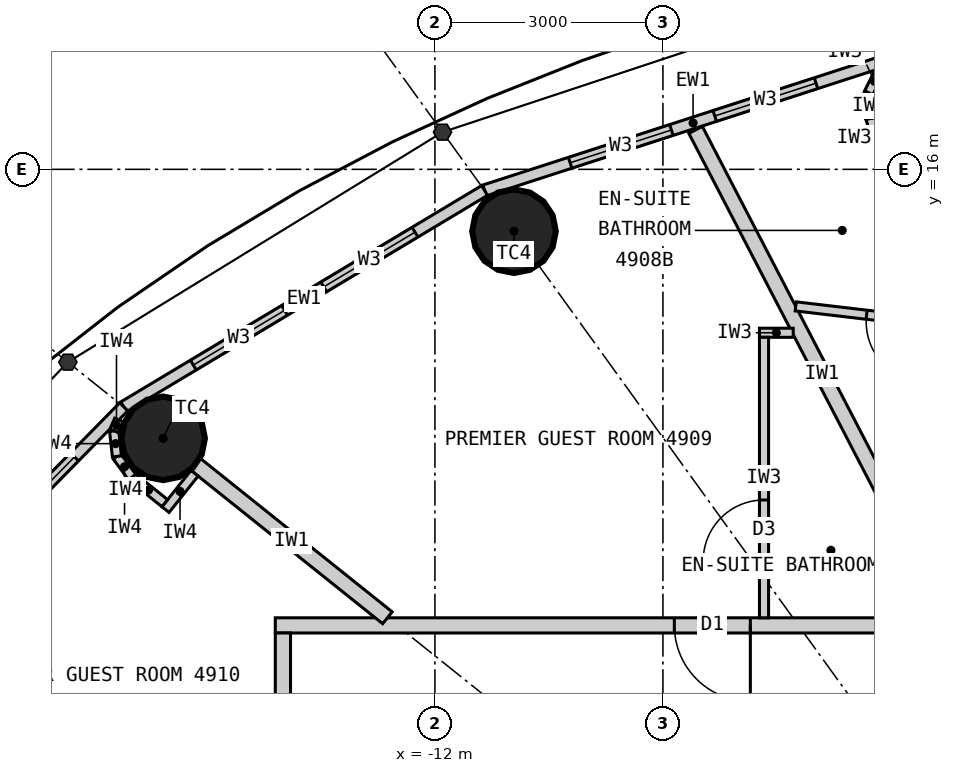
"""IFC4 building model, lengths in metres.
Left out: names, types, materials, properties, quantities, classifications, styles, units other than length and angle.
Written with IfcOpenShell. Run it as: python <this file> out.ifc"""

import sys

from ifc_helpers import new_model, si_unit, direction, frame, frame_2d, origin, origin_2d, place, context, subcontext, project, spatial, rectangle, circle, extrude, clip, halfspace, element, fill, save


model = new_model("IFC4")
c1 = context("Model", 3, precision=1e-05, world=origin(), true_north=direction((0.0, 1.0)))
c2 = subcontext(c1, "Body", "Model", "MODEL_VIEW")
j1 = project(units=[si_unit("LENGTHUNIT", "METRE"), si_unit("PLANEANGLEUNIT", "RADIAN")], contexts=[c1])
p1 = place(None, origin())
s1 = spatial("IfcSite", under=j1, at=p1, CompositionType="ELEMENT")
p2 = place(p1, origin())
s2 = spatial("IfcBuilding", under=s1, at=p2, CompositionType="ELEMENT")
p3 = place(p2, frame((0.0, 0.0, 183.0)))
s3 = spatial("IfcBuildingStorey", under=s2, at=p3, CompositionType="ELEMENT", Elevation=183.0)
for number, where, z_axis, x_axis in (
    (1, (-10.96, 15.186, 0.0), (0.0, 0.0, 1.0), (1.0, 0.0, 0.0)),
    (2, (-15.576, 12.461, 0.0), (0.0, 0.0, 1.0), (1.0, 0.0, 0.0)),
):
    element("IfcColumn", number, at=place(p3, frame(where, z_axis=z_axis, x_axis=x_axis)), inside=s3, PredefinedType="COLUMN", context=c2, shape_type="Clipping", body=[
        clip(extrude(circle(Radius=0.55, at=origin_2d()), origin(), (0.0, 0.0, 1.0), 3.3), halfspace(frame((0.0, 0.0, 2.25), z_axis=(0.0, 0.0, 1.0), x_axis=(1.0, 0.0, 0.0)), False)),
    ])
p4 = place(p3, frame((-5.86, 17.497, 0.0), z_axis=(0.0, 0.0, 1.0), x_axis=(-0.951432482129, -0.307857486429, 0.0)))
e3 = element("IfcWall", 3, at=p4, inside=s3, PredefinedType="ELEMENTEDWALL", context=c2, shape_type="SweptSolid", body=[
    extrude(rectangle(XDim=5.766, YDim=0.15, at=frame_2d((2.883, 0.0))), origin(), (0.0, 0.0, 1.0), 3.05),
])
p5 = place(p4, frame((1.183, 0.0, 0.9)))
e4 = element("IfcOpeningElement", 4, at=p5, cuts=e3, PredefinedType="OPENING", context=c2, shape_type="SweptSolid", body=[
    extrude(rectangle(XDim=1.4, YDim=1.9, at=frame_2d((0.7, 0.95))), frame((0.0, 0.085, 0.0), z_axis=(0.0, -1.0, 0.0), x_axis=(1.0, 0.0, 0.0)), (0.0, 0.0, 1.0), 0.17),
])
p6 = place(p4, frame((3.183, 0.0, 0.9)))
e5 = element("IfcOpeningElement", 5, at=p6, cuts=e3, PredefinedType="OPENING", context=c2, shape_type="SweptSolid", body=[
    extrude(rectangle(XDim=1.4, YDim=1.9, at=frame_2d((0.7, 0.95))), frame((0.0, 0.085, 0.0), z_axis=(0.0, -1.0, 0.0), x_axis=(1.0, 0.0, 0.0)), (0.0, 0.0, 1.0), 0.17),
])
p7 = place(p3, frame((-11.346, 15.722, 0.0), z_axis=(0.0, 0.0, 1.0), x_axis=(-0.857695199231, -0.514158482587, 0.0)))
e6 = element("IfcWall", 6, at=p7, inside=s3, PredefinedType="ELEMENTEDWALL", context=c2, shape_type="SweptSolid", body=[
    extrude(rectangle(XDim=5.536, YDim=0.15, at=frame_2d((2.768, 0.0))), origin(), (0.0, 0.0, 1.0), 3.05),
])
p8 = place(p7, frame((1.068, 0.0, 0.9)))
e7 = element("IfcOpeningElement", 7, at=p8, cuts=e6, PredefinedType="OPENING", context=c2, shape_type="SweptSolid", body=[
    extrude(rectangle(XDim=1.4, YDim=1.9, at=frame_2d((0.7, 0.95))), frame((0.0, 0.085, 0.0), z_axis=(0.0, -1.0, 0.0), x_axis=(1.0, 0.0, 0.0)), (0.0, 0.0, 1.0), 0.17),
])
p9 = place(p7, frame((3.068, 0.0, 0.9)))
e8 = element("IfcOpeningElement", 8, at=p9, cuts=e6, PredefinedType="OPENING", context=c2, shape_type="SweptSolid", body=[
    extrude(rectangle(XDim=1.4, YDim=1.9, at=frame_2d((0.7, 0.95))), frame((0.0, 0.085, 0.0), z_axis=(0.0, -1.0, 0.0), x_axis=(1.0, 0.0, 0.0)), (0.0, 0.0, 1.0), 0.17),
])
p10 = place(p3, frame((-16.095, 12.876, 0.0), z_axis=(0.0, 0.0, 1.0), x_axis=(-0.700727467776, -0.71342905457, 0.0)))
e9 = element("IfcWall", 9, at=p10, inside=s3, PredefinedType="ELEMENTEDWALL", context=c2, shape_type="SweptSolid", body=[
    extrude(rectangle(XDim=5.247, YDim=0.15, at=frame_2d((2.624, 0.0))), origin(), (0.0, 0.0, 1.0), 3.05),
])
p11 = place(p10, frame((0.924, 0.0, 0.9)))
e10 = element("IfcOpeningElement", 10, at=p11, cuts=e9, PredefinedType="OPENING", context=c2, shape_type="SweptSolid", body=[
    extrude(rectangle(XDim=1.4, YDim=1.9, at=frame_2d((0.7, 0.95))), frame((0.0, 0.085, 0.0), z_axis=(0.0, -1.0, 0.0), x_axis=(1.0, 0.0, 0.0)), (0.0, 0.0, 1.0), 0.17),
])
p12 = place(p10, frame((2.924, 0.0, 0.9)))
e11 = element("IfcOpeningElement", 11, at=p12, cuts=e9, PredefinedType="OPENING", context=c2, shape_type="SweptSolid", body=[
    extrude(rectangle(XDim=1.4, YDim=1.9, at=frame_2d((0.7, 0.95))), frame((0.0, 0.085, 0.0), z_axis=(0.0, -1.0, 0.0), x_axis=(1.0, 0.0, 0.0)), (0.0, 0.0, 1.0), 0.17),
])
p13 = place(p3, frame((-14.1, 10.0, 0.0), z_axis=(0.0, 0.0, 1.0), x_axis=(1.0, 0.0, 0.0)))
e12 = element("IfcWall", 12, at=p13, inside=s3, PredefinedType="PARTITIONING", context=c2, shape_type="SweptSolid", body=[
    extrude(rectangle(XDim=28.2, YDim=0.2, at=frame_2d((14.1, 0.0))), origin(), (0.0, 0.0, 1.0), 3.05),
])
p14 = place(p13, frame((24.549, 0.0, 0.0)))
e13 = element("IfcOpeningElement", 13, at=p14, cuts=e12, PredefinedType="OPENING", context=c2, shape_type="SweptSolid", body=[
    extrude(rectangle(XDim=1.0, YDim=2.2, at=frame_2d((0.5, 1.1))), frame((0.0, 0.11, 0.0), z_axis=(0.0, -1.0, 0.0), x_axis=(1.0, 0.0, 0.0)), (0.0, 0.0, 1.0), 0.22),
])
p15 = place(p13, frame((18.829, 0.0, 0.0)))
e14 = element("IfcOpeningElement", 14, at=p15, cuts=e12, PredefinedType="OPENING", context=c2, shape_type="SweptSolid", body=[
    extrude(rectangle(XDim=1.0, YDim=2.2, at=frame_2d((0.5, 1.1))), frame((0.0, 0.11, 0.0), z_axis=(0.0, -1.0, 0.0), x_axis=(1.0, 0.0, 0.0)), (0.0, 0.0, 1.0), 0.22),
])
p16 = place(p13, frame((12.8, 0.0, 0.0)))
e15 = element("IfcOpeningElement", 15, at=p16, cuts=e12, PredefinedType="OPENING", context=c2, shape_type="SweptSolid", body=[
    extrude(rectangle(XDim=1.0, YDim=2.2, at=frame_2d((0.5, 1.1))), frame((0.0, 0.11, 0.0), z_axis=(0.0, -1.0, 0.0), x_axis=(1.0, 0.0, 0.0)), (0.0, 0.0, 1.0), 0.22),
])
p17 = place(p13, frame((5.25, 0.0, 0.0)))
e16 = element("IfcOpeningElement", 16, at=p17, cuts=e12, PredefinedType="OPENING", context=c2, shape_type="SweptSolid", body=[
    extrude(rectangle(XDim=1.0, YDim=2.2, at=frame_2d((0.5, 1.1))), frame((0.0, 0.11, 0.0), z_axis=(0.0, -1.0, 0.0), x_axis=(1.0, 0.0, 0.0)), (0.0, 0.0, 1.0), 0.22),
])
p18 = place(p3, frame((-14.0, 9.9, 0.0), z_axis=(0.0, 0.0, 1.0), x_axis=(0.0, -1.0, 0.0)))
e17 = element("IfcWall", 17, at=p18, inside=s3, PredefinedType="PARTITIONING", context=c2, shape_type="SweptSolid", body=[
    extrude(rectangle(XDim=19.8, YDim=0.2, at=frame_2d((9.9, 0.0))), origin(), (0.0, 0.0, 1.0), 3.05),
])
p19 = place(p18, frame((17.701, 0.0, 0.0)))
e18 = element("IfcOpeningElement", 18, at=p19, cuts=e17, PredefinedType="OPENING", context=c2, shape_type="SweptSolid", body=[
    extrude(rectangle(XDim=1.0, YDim=2.2, at=frame_2d((0.5, 1.1))), frame((0.0, 0.11, 0.0), z_axis=(0.0, -1.0, 0.0), x_axis=(1.0, 0.0, 0.0)), (0.0, 0.0, 1.0), 0.22),
])
p20 = place(p18, frame((1.1, 0.0, 0.0)))
e19 = element("IfcOpeningElement", 19, at=p20, cuts=e17, PredefinedType="OPENING", context=c2, shape_type="SweptSolid", body=[
    extrude(rectangle(XDim=1.0, YDim=2.2, at=frame_2d((0.5, 1.1))), frame((0.0, 0.11, 0.0), z_axis=(0.0, -1.0, 0.0), x_axis=(1.0, 0.0, 0.0)), (0.0, 0.0, 1.0), 0.22),
])
p21 = place(p18, frame((6.574, 0.0, 0.0)))
e20 = element("IfcOpeningElement", 20, at=p21, cuts=e17, PredefinedType="OPENING", context=c2, shape_type="SweptSolid", body=[
    extrude(rectangle(XDim=1.0, YDim=2.2, at=frame_2d((0.5, 1.1))), frame((0.0, 0.11, 0.0), z_axis=(0.0, -1.0, 0.0), x_axis=(1.0, 0.0, 0.0)), (0.0, 0.0, 1.0), 0.22),
])
p22 = place(p18, frame((12.465, 0.0, 0.0)))
e21 = element("IfcOpeningElement", 21, at=p22, cuts=e17, PredefinedType="OPENING", context=c2, shape_type="SweptSolid", body=[
    extrude(rectangle(XDim=1.0, YDim=2.1, at=frame_2d((0.5, 1.05))), frame((0.0, 0.11, 0.0), z_axis=(0.0, -1.0, 0.0), x_axis=(1.0, 0.0, 0.0)), (0.0, 0.0, 1.0), 0.22),
])
p23 = place(p3, frame((-5.24, 10.1, 0.0), z_axis=(0.0, 0.0, 1.0), x_axis=(-0.460532965373, 0.887642601391, 0.0)))
e22 = element("IfcWall", 22, at=p23, inside=s3, PredefinedType="PARTITIONING", context=c2, shape_type="SweptSolid", body=[
    extrude(rectangle(XDim=7.231, YDim=0.2, at=frame_2d((3.616, 0.0))), origin(), (0.0, 0.0, 1.0), 3.05),
])
p24 = place(p3, frame((-12.625, 10.1, 0.0), z_axis=(0.0, 0.0, 1.0), x_axis=(-0.780876185034, 0.624685827954, 0.0)))
e23 = element("IfcWall", 23, at=p24, inside=s3, PredefinedType="PARTITIONING", context=c2, shape_type="SweptSolid", body=[
    extrude(rectangle(XDim=3.229, YDim=0.2, at=frame_2d((1.615, 0.0))), origin(), (0.0, 0.0, 1.0), 2.25),
])
p25 = place(p3, frame((-7.253, 14.197, 0.0), z_axis=(0.0, 0.0, 1.0), x_axis=(0.993128188393, -0.117031625725, 0.0)))
e24 = element("IfcWall", 24, at=p25, inside=s3, PredefinedType="PARTITIONING", context=c2, shape_type="SweptSolid", body=[
    extrude(rectangle(XDim=2.678, YDim=0.12, at=frame_2d((1.339, 0.0))), origin(), (0.0, 0.0, 1.0), 3.05),
])
p26 = place(p25, frame((0.939, 0.0, 0.0)))
e25 = element("IfcOpeningElement", 25, at=p26, cuts=e24, PredefinedType="OPENING", context=c2, shape_type="SweptSolid", body=[
    extrude(rectangle(XDim=0.8, YDim=2.1, at=frame_2d((0.4, 1.05))), frame((0.0, 0.07, 0.0), z_axis=(0.0, -1.0, 0.0), x_axis=(1.0, 0.0, 0.0)), (0.0, 0.0, 1.0), 0.14),
])
p27 = place(p3, frame((-6.097, 16.149, 0.0), z_axis=(0.0, 0.0, 1.0), x_axis=(-0.317292604854, 0.948327687514, 0.0)))
e26 = element("IfcWall", 26, at=p27, inside=s3, PredefinedType="PARTITIONING", context=c2, shape_type="SweptSolid", body=[
    extrude(rectangle(XDim=0.55, YDim=0.12, at=frame_2d((0.275, 0.0))), origin(), (0.0, 0.0, 1.0), 3.05),
])
for number, where, z_axis, x_axis in (
    (27, (-6.271, 16.67, 0.0), (0.0, 0.0, 1.0), (-0.061, 0.998, 0.0)),
    (28, (-6.292, 17.007, 0.0), (0.0, 0.0, 1.0), (0.445, 0.895, 0.0)),
):
    element("IfcWall", number, at=place(p3, frame(where, z_axis=z_axis, x_axis=x_axis)), inside=s3, PredefinedType="PARTITIONING", context=c2, shape_type="SweptSolid", body=[
        extrude(rectangle(XDim=0.338, YDim=0.12, at=frame_2d((0.169, 0.0))), origin(), (0.0, 0.0, 1.0), 3.05),
    ])
p28 = place(p3, frame((-7.286, 13.85, 0.0), z_axis=(0.0, 0.0, 1.0), x_axis=(-1.0, 0.0, 0.0)))
e29 = element("IfcWall", 29, at=p28, inside=s3, PredefinedType="PARTITIONING", context=c2, shape_type="SweptSolid", body=[
    extrude(rectangle(XDim=0.444, YDim=0.12, at=frame_2d((0.222, 0.0))), origin(), (0.0, 0.0, 1.0), 3.05),
])
p29 = place(p3, frame((-7.67, 10.1, 0.0), z_axis=(0.0, 0.0, 1.0), x_axis=(0.0, 1.0, 0.0)))
e30 = element("IfcWall", 30, at=p29, inside=s3, PredefinedType="PARTITIONING", context=c2, shape_type="SweptSolid", body=[
    extrude(rectangle(XDim=3.69, YDim=0.12, at=frame_2d((1.845, 0.0))), origin(), (0.0, 0.0, 1.0), 3.05),
])
p30 = place(p29, frame((0.75, 0.0, 0.0)))
e31 = element("IfcOpeningElement", 31, at=p30, cuts=e30, PredefinedType="OPENING", context=c2, shape_type="SweptSolid", body=[
    extrude(rectangle(XDim=0.8, YDim=2.1, at=frame_2d((0.4, 1.05))), frame((0.0, 0.07, 0.0), z_axis=(0.0, -1.0, 0.0), x_axis=(1.0, 0.0, 0.0)), (0.0, 0.0, 1.0), 0.14),
])
p31 = place(p3, frame((-15.162, 12.002, 0.0), z_axis=(0.0, 0.0, 1.0), x_axis=(-0.624597762427, -0.780946627607, 0.0)))
e32 = element("IfcWall", 32, at=p31, inside=s3, PredefinedType="PARTITIONING", context=c2, shape_type="SweptSolid", body=[
    extrude(rectangle(XDim=0.612, YDim=0.12, at=frame_2d((0.306, 0.0))), origin(), (0.0, 0.0, 1.0), 3.05),
])
p32 = place(p3, frame((-15.554, 11.608, 0.0), z_axis=(0.0, 0.0, 1.0), x_axis=(-0.780695577787, 0.624911525597, 0.0)))
e33 = element("IfcWall", 33, at=p32, inside=s3, PredefinedType="PARTITIONING", context=c2, shape_type="SweptSolid", body=[
    extrude(rectangle(XDim=0.55, YDim=0.12, at=frame_2d((0.275, 0.0))), origin(), (0.0, 0.0, 1.0), 3.05),
])
p33 = place(p3, frame((-15.984, 11.952, 0.0), z_axis=(0.0, 0.0, 1.0), x_axis=(-0.592335221171, 0.805691619517, 0.0)))
e34 = element("IfcWall", 34, at=p33, inside=s3, PredefinedType="PARTITIONING", context=c2, shape_type="SweptSolid", body=[
    extrude(rectangle(XDim=0.338, YDim=0.12, at=frame_2d((0.169, 0.0))), origin(), (0.0, 0.0, 1.0), 3.05),
])
p34 = place(p3, frame((-16.184, 12.224, 0.0), z_axis=(0.0, 0.0, 1.0), x_axis=(-0.110669692975, 0.993857242795, 0.0)))
e35 = element("IfcWall", 35, at=p34, inside=s3, PredefinedType="PARTITIONING", context=c2, shape_type="SweptSolid", body=[
    extrude(rectangle(XDim=0.337, YDim=0.12, at=frame_2d((0.169, 0.0))), origin(), (0.0, 0.0, 1.0), 3.05),
])
p35 = place(p3, frame((-16.221, 12.559, 0.0), z_axis=(0.0, 0.0, 1.0), x_axis=(0.401064416249, 0.916049853457, 0.0)))
e36 = element("IfcWall", 36, at=p35, inside=s3, PredefinedType="PARTITIONING", context=c2, shape_type="SweptSolid", body=[
    extrude(rectangle(XDim=0.156, YDim=0.12, at=frame_2d((0.078, 0.0))), origin(), (0.0, 0.0, 1.0), 3.05),
])
p36 = place(p5, origin())
e37 = element("IfcWindow", 37, at=p36, inside=s3, PartitioningType="SINGLE_PANEL", PredefinedType="WINDOW", context=c2, shape_type="SweptSolid", body=[
    extrude(rectangle(XDim=1.4, YDim=1.9, at=frame_2d((0.7, 0.95))), frame((0.0, 0.03, 0.0), z_axis=(0.0, -1.0, 0.0), x_axis=(1.0, 0.0, 0.0)), (0.0, 0.0, 1.0), 0.06),
])
fill(e4, e37)
p37 = place(p6, origin())
e38 = element("IfcWindow", 38, at=p37, inside=s3, PartitioningType="SINGLE_PANEL", PredefinedType="WINDOW", context=c2, shape_type="SweptSolid", body=[
    extrude(rectangle(XDim=1.4, YDim=1.9, at=frame_2d((0.7, 0.95))), frame((0.0, 0.03, 0.0), z_axis=(0.0, -1.0, 0.0), x_axis=(1.0, 0.0, 0.0)), (0.0, 0.0, 1.0), 0.06),
])
fill(e5, e38)
p38 = place(p8, origin())
e39 = element("IfcWindow", 39, at=p38, inside=s3, PartitioningType="SINGLE_PANEL", PredefinedType="WINDOW", context=c2, shape_type="SweptSolid", body=[
    extrude(rectangle(XDim=1.4, YDim=1.9, at=frame_2d((0.7, 0.95))), frame((0.0, 0.03, 0.0), z_axis=(0.0, -1.0, 0.0), x_axis=(1.0, 0.0, 0.0)), (0.0, 0.0, 1.0), 0.06),
])
fill(e7, e39)
p39 = place(p9, origin())
e40 = element("IfcWindow", 40, at=p39, inside=s3, PartitioningType="SINGLE_PANEL", PredefinedType="WINDOW", context=c2, shape_type="SweptSolid", body=[
    extrude(rectangle(XDim=1.4, YDim=1.9, at=frame_2d((0.7, 0.95))), frame((0.0, 0.03, 0.0), z_axis=(0.0, -1.0, 0.0), x_axis=(1.0, 0.0, 0.0)), (0.0, 0.0, 1.0), 0.06),
])
fill(e8, e40)
p40 = place(p11, origin())
e41 = element("IfcWindow", 41, at=p40, inside=s3, PartitioningType="SINGLE_PANEL", PredefinedType="WINDOW", context=c2, shape_type="SweptSolid", body=[
    extrude(rectangle(XDim=1.4, YDim=1.9, at=frame_2d((0.7, 0.95))), frame((0.0, 0.03, 0.0), z_axis=(0.0, -1.0, 0.0), x_axis=(1.0, 0.0, 0.0)), (0.0, 0.0, 1.0), 0.06),
])
fill(e10, e41)
p41 = place(p26, origin())
e42 = element("IfcDoor", 42, at=p41, inside=s3, OperationType="SINGLE_SWING_RIGHT", PredefinedType="DOOR", context=c2, shape_type="SweptSolid", body=[
    extrude(rectangle(XDim=0.8, YDim=2.1, at=frame_2d((0.4, 1.05))), frame((0.0, 0.025, 0.0), z_axis=(0.0, -1.0, 0.0), x_axis=(1.0, 0.0, 0.0)), (0.0, 0.0, 1.0), 0.05),
])
fill(e25, e42)
p42 = place(p30, origin())
e43 = element("IfcDoor", 43, at=p42, inside=s3, OperationType="SINGLE_SWING_LEFT", PredefinedType="DOOR", context=c2, shape_type="SweptSolid", body=[
    extrude(rectangle(XDim=0.8, YDim=2.1, at=frame_2d((0.4, 1.05))), frame((0.0, 0.025, 0.0), z_axis=(0.0, -1.0, 0.0), x_axis=(1.0, 0.0, 0.0)), (0.0, 0.0, 1.0), 0.05),
])
fill(e31, e43)
p43 = place(p17, origin())
e44 = element("IfcDoor", 44, at=p43, inside=s3, OperationType="SINGLE_SWING_RIGHT", PredefinedType="DOOR", context=c2, shape_type="SweptSolid", body=[
    extrude(rectangle(XDim=1.0, YDim=2.2, at=frame_2d((0.5, 1.1))), frame((0.0, 0.025, 0.0), z_axis=(0.0, -1.0, 0.0), x_axis=(1.0, 0.0, 0.0)), (0.0, 0.0, 1.0), 0.05),
])
fill(e16, e44)
save(model, sys.argv[1])
